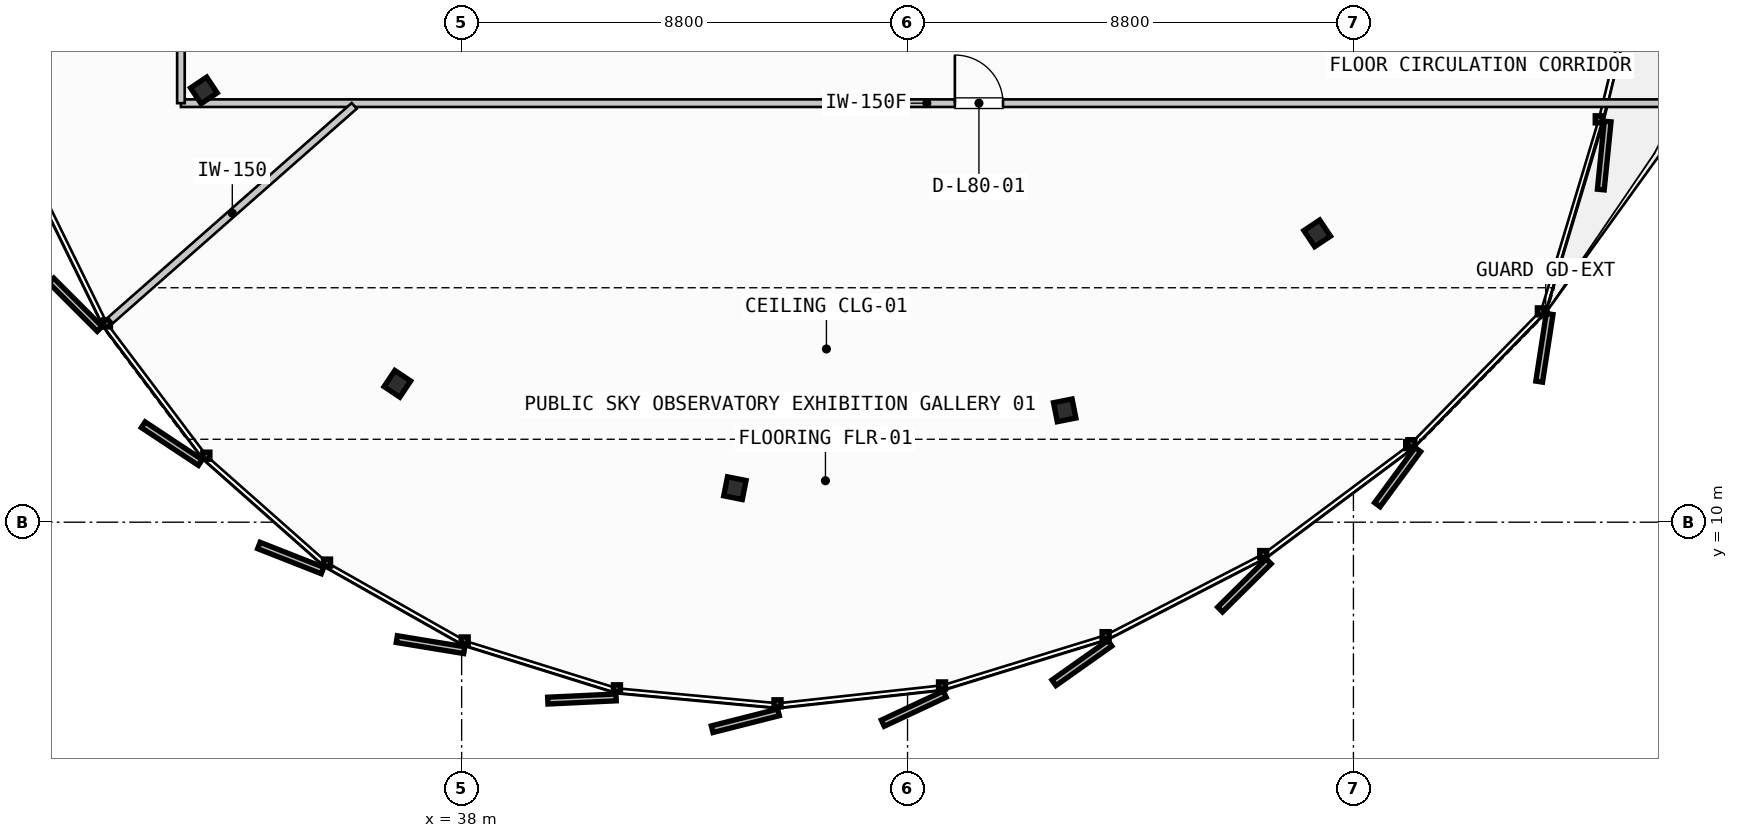
"""IFC4 building model, lengths in metres.
Left out: names, types, materials, properties, quantities, classifications, styles, units other than length and angle.
Written with IfcOpenShell. Run it as: python <this file> out.ifc"""

import sys

from ifc_helpers import new_model, si_unit, direction, frame, frame_2d, origin, origin_2d, place, context, subcontext, project, spatial, rectangle, i_section, extrude, source, transform, mapped, element, fill, save


model = new_model("IFC4")
c1 = context("Model", 3, precision=1e-05, world=origin(), true_north=direction((0.0, 1.0)))
c2 = subcontext(c1, "Body", "Model", "MODEL_VIEW")
j1 = project(units=[si_unit("LENGTHUNIT", "METRE"), si_unit("PLANEANGLEUNIT", "RADIAN")], contexts=[c1])
p1 = place(None, origin())
s1 = spatial("IfcSite", under=j1, at=p1, CompositionType="ELEMENT")
p2 = place(p1, origin())
s2 = spatial("IfcBuilding", under=s1, at=p2, CompositionType="ELEMENT")
p3 = place(p2, frame((0.0, 0.0, 300.85)))
s3 = spatial("IfcBuildingStorey", under=s2, at=p3, CompositionType="ELEMENT", Elevation=300.85)
m1 = source(origin(), c2, "Body", "SweptSolid", [
    extrude(i_section(OverallWidth=0.374, OverallDepth=0.383, WebThickness=0.017, FlangeThickness=0.026, FilletRadius=0.015, at=origin_2d()), origin(), (0.0, 0.0, 1.0), 3.185),
])
for number, where, z_axis, x_axis in (
    (1, (32.913, 18.521, 0.0), (0.0, 0.0, 1.0), (-0.831, -0.556, 0.0)),
    (2, (36.731, 12.731, 0.0), (0.0, 0.0, 1.0), (-0.556, -0.831, 0.0)),
    (3, (43.393, 10.671, 0.0), (0.0, 0.0, 1.0), (-0.195, -0.981, 0.0)),
    (4, (49.902, 12.207, 0.0), (0.0, 0.0, 1.0), (0.195, -0.981, 0.0)),
    (5, (54.885, 15.7, 0.0), (0.0, 0.0, 1.0), (0.556, -0.831, 0.0)),
):
    element("IfcColumn", number, at=place(p3, frame(where, z_axis=z_axis, x_axis=x_axis)), inside=s3, PredefinedType="COLUMN", context=c2, shape_type="MappedRepresentation", body=[
        mapped(m1, transform((0.0, 0.0, 0.0), scale=1.0)),
    ])
p4 = place(p3, frame((32.46, 18.269, 0.0), z_axis=(0.0, 0.0, 1.0), x_axis=(1.0, 0.0, 0.0)))
e6 = element("IfcWall", 6, at=p4, inside=s3, PredefinedType="PARTITIONING", context=c2, shape_type="SweptSolid", body=[
    extrude(rectangle(XDim=29.442, YDim=0.15, at=frame_2d((14.721, 0.0))), origin(), (0.0, 0.0, 1.0), 2.28),
])
p5 = place(p4, frame((15.274, 0.0, 0.0)))
e7 = element("IfcOpeningElement", 7, at=p5, cuts=e6, PredefinedType="OPENING", context=c2, shape_type="SweptSolid", body=[
    extrude(rectangle(XDim=0.95, YDim=2.15, at=frame_2d((0.475, 1.075))), frame((0.0, 0.085, 0.0), z_axis=(0.0, -1.0, 0.0), x_axis=(1.0, 0.0, 0.0)), (0.0, 0.0, 1.0), 0.17),
])
p6 = place(p3, frame((32.46, 37.1, 0.0), z_axis=(0.0, 0.0, 1.0), x_axis=(0.0, -1.0, 0.0)))
e8 = element("IfcWall", 8, at=p6, inside=s3, PredefinedType="PARTITIONING", context=c2, shape_type="SweptSolid", body=[
    extrude(rectangle(XDim=18.831, YDim=0.15, at=frame_2d((9.416, 0.0))), origin(), (0.0, 0.0, 1.0), 2.28),
])
p7 = place(p6, frame((10.185, 0.0, 0.0)))
e9 = element("IfcOpeningElement", 9, at=p7, cuts=e8, PredefinedType="OPENING", context=c2, shape_type="SweptSolid", body=[
    extrude(rectangle(XDim=0.95, YDim=2.15, at=frame_2d((0.475, 1.075))), frame((0.0, 0.085, 0.0), z_axis=(0.0, -1.0, 0.0), x_axis=(1.0, 0.0, 0.0)), (0.0, 0.0, 1.0), 0.17),
])
p8 = place(p3, frame((35.88, 18.216, 0.0), z_axis=(0.0, 0.0, 1.0), x_axis=(-0.750830608128, -0.660494812923, 0.0)))
e10 = element("IfcWall", 10, at=p8, inside=s3, PredefinedType="PARTITIONING", context=c2, shape_type="SweptSolid", body=[
    extrude(rectangle(XDim=6.411, YDim=0.15, at=frame_2d((3.205, 0.0))), origin(), (0.0, 0.0, 1.0), 2.28),
])
m2 = source(origin(), c2, "Body", "SweptSolid", [
    extrude(rectangle(XDim=0.95, YDim=2.15, at=frame_2d((0.475, 1.075))), frame((0.0, 0.025, 0.0), z_axis=(0.0, -1.0, 0.0), x_axis=(1.0, 0.0, 0.0)), (0.0, 0.0, 1.0), 0.05),
])
p9 = place(p5, origin())
e11 = element("IfcDoor", 11, at=p9, inside=s3, OperationType="SINGLE_SWING_LEFT", PredefinedType="DOOR", context=c2, shape_type="MappedRepresentation", body=[
    mapped(m2, transform((0.0, 0.0, 0.0), scale=1.0)),
])
fill(e7, e11)
save(model, sys.argv[1])
